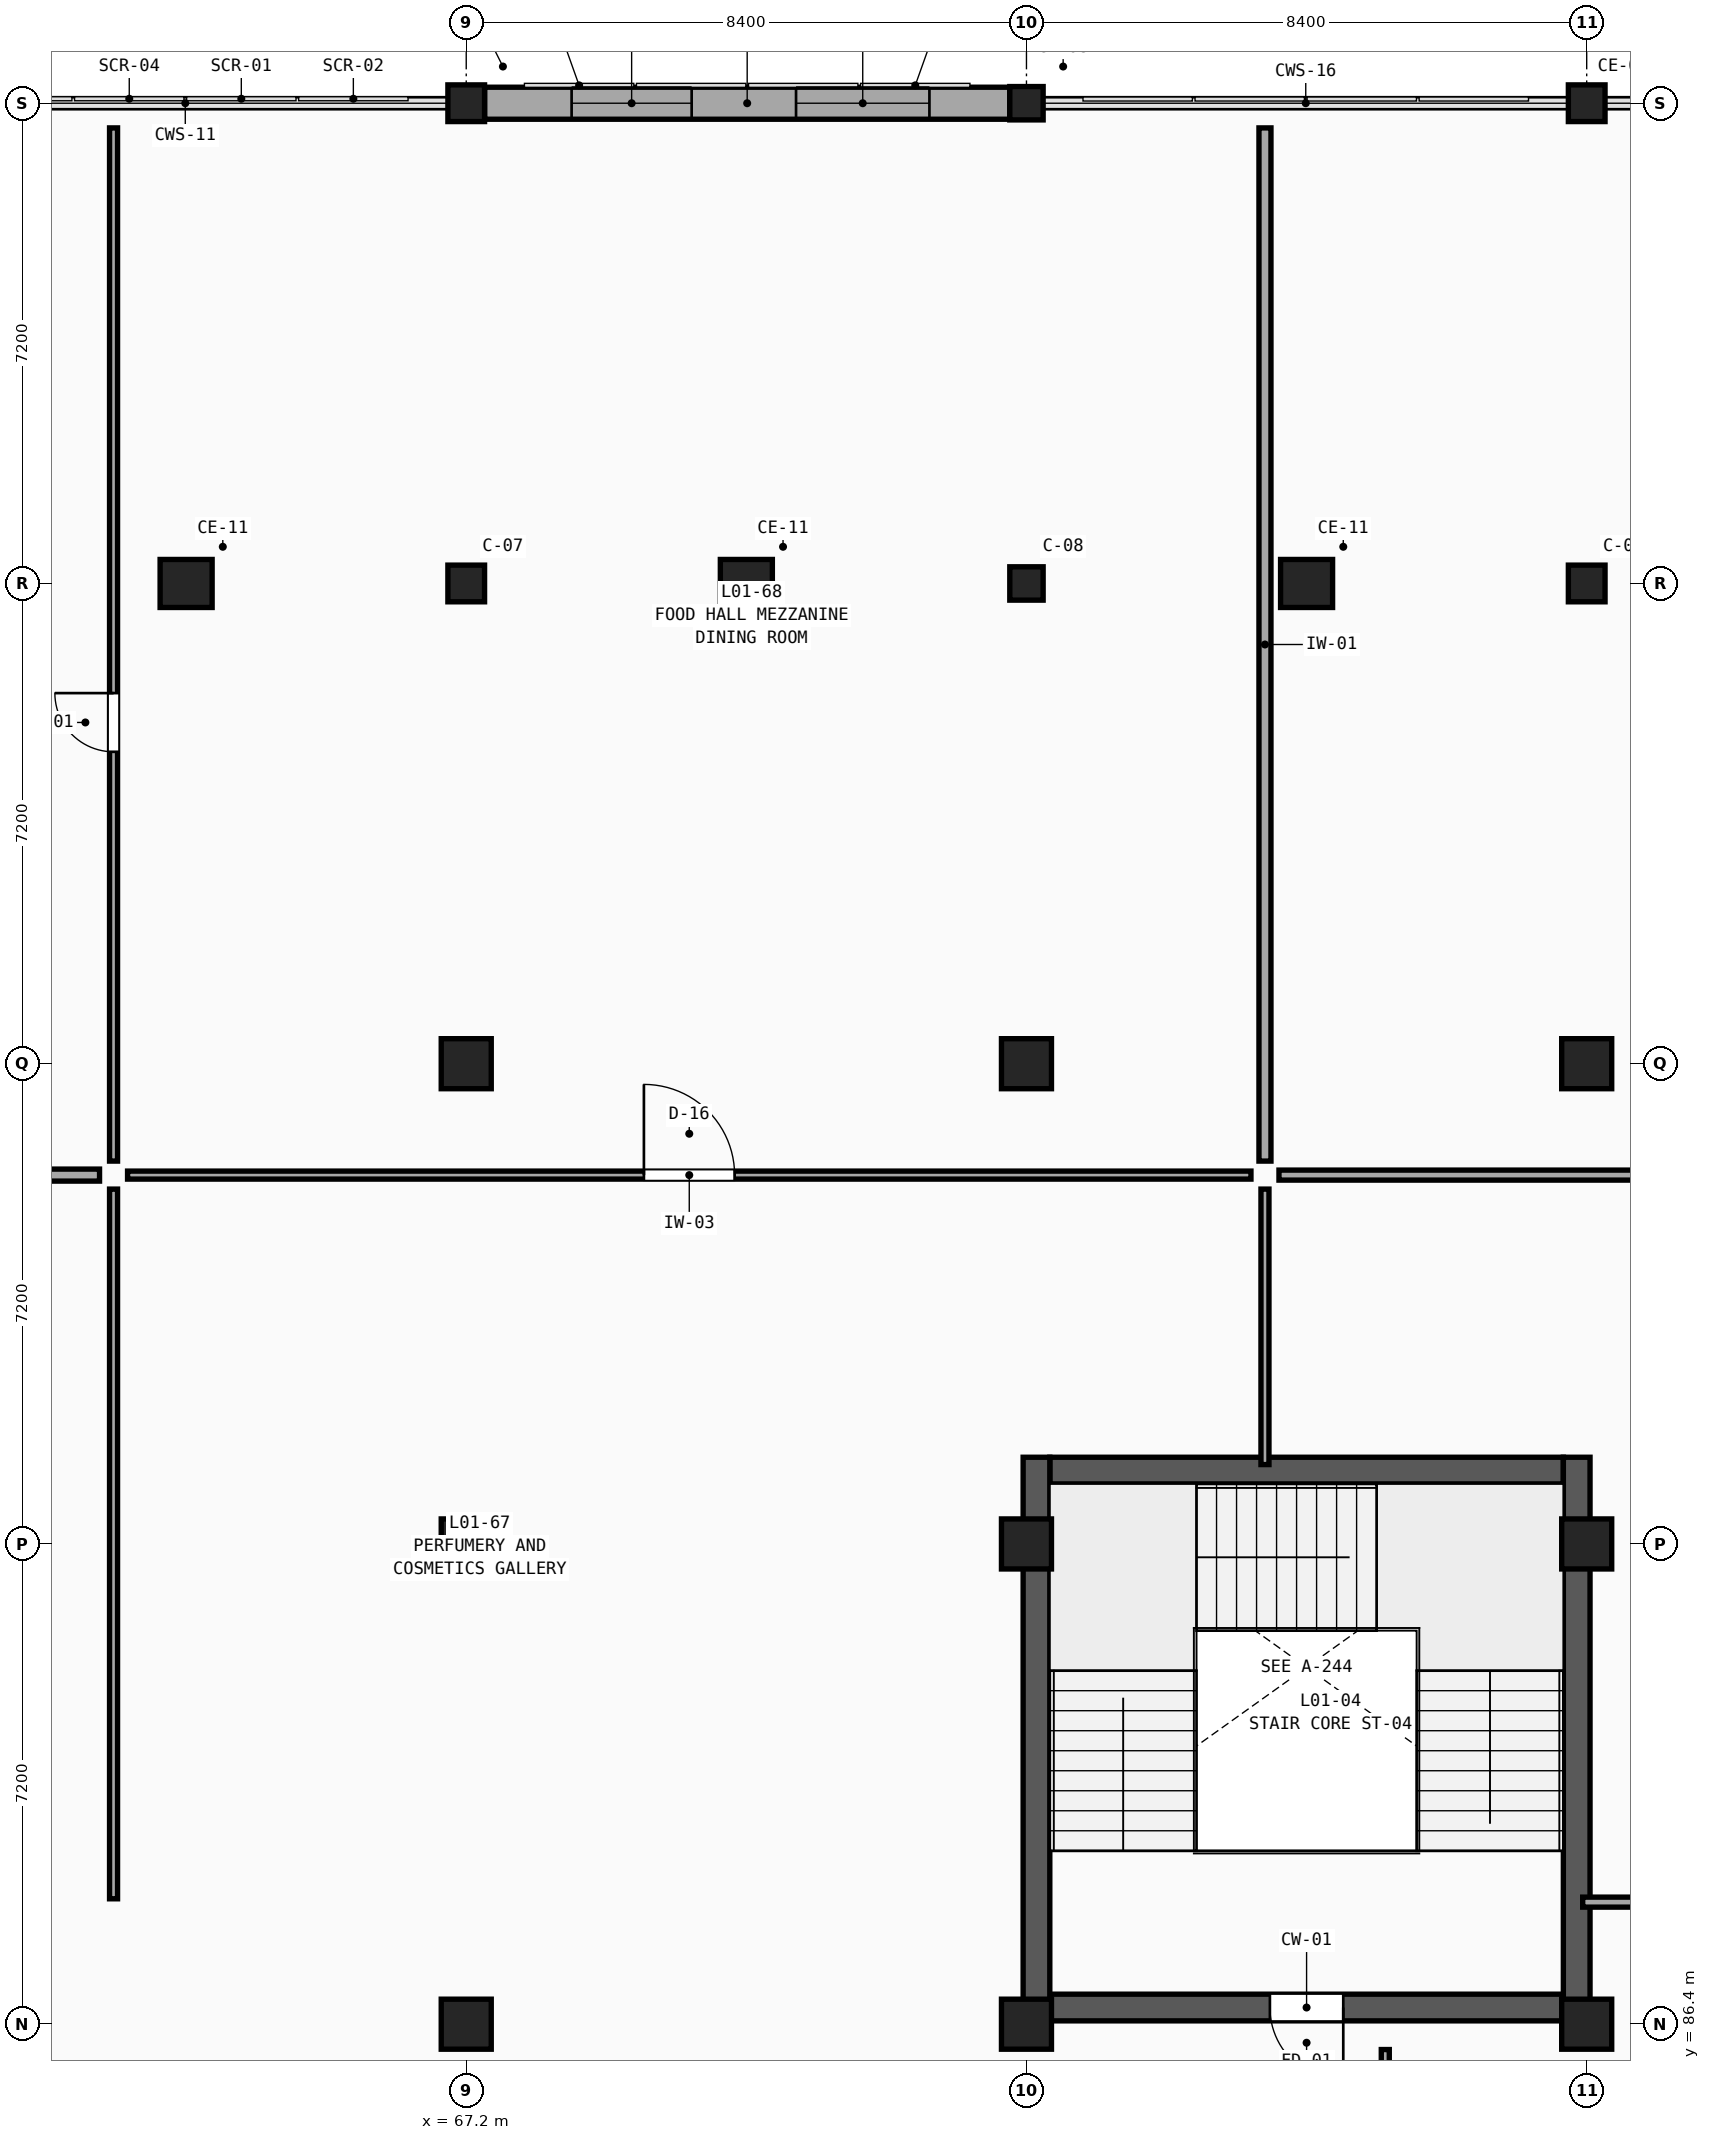
"""IFC4 building model, lengths in metres.
Left out: names, types, materials, properties, quantities, classifications, styles, units other than length and angle.
Written with IfcOpenShell. Run it as: python <this file> out.ifc"""

import sys

from ifc_helpers import new_model, si_unit, direction, frame, frame_2d, origin, origin_2d, place, context, subcontext, project, spatial, rectangle, extrude, element, fill, save


model = new_model("IFC4")
c1 = context("Model", 3, precision=1e-05, world=origin(), true_north=direction((0.0, 1.0)))
c2 = subcontext(c1, "Body", "Model", "MODEL_VIEW")
j1 = project(units=[si_unit("LENGTHUNIT", "METRE"), si_unit("PLANEANGLEUNIT", "RADIAN")], contexts=[c1])
p1 = place(None, origin())
s1 = spatial("IfcSite", under=j1, at=p1, CompositionType="ELEMENT")
p2 = place(p1, origin())
s2 = spatial("IfcBuilding", under=s1, at=p2, CompositionType="ELEMENT")
p3 = place(p2, frame((0.0, 0.0, 5.4)))
s3 = spatial("IfcBuildingStorey", under=s2, at=p3, CompositionType="ELEMENT", Elevation=5.4)
for number, where, z_axis, x_axis in (
    (1, (67.2, 86.4, 0.0), (0.0, 0.0, 1.0), (1.0, 0.0, 0.0)),
    (2, (67.2, 93.6, 0.0), (0.0, 0.0, 1.0), (1.0, 0.0, 0.0)),
    (3, (67.2, 100.8, 0.0), (0.0, 0.0, 1.0), (1.0, 0.0, 0.0)),
):
    element("IfcColumn", number, at=place(p3, frame(where, z_axis=z_axis, x_axis=x_axis)), inside=s3, PredefinedType="COLUMN", context=c2, shape_type="SweptSolid", body=[
        extrude(rectangle(XDim=0.75, YDim=0.75, at=origin_2d()), origin(), (0.0, 0.0, 1.0), 4.5),
    ])
for number, where, z_axis, x_axis in (
    (4, (67.2, 108.0, 0.0), (0.0, 0.0, 1.0), (1.0, 0.0, 0.0)),
    (5, (67.2, 115.2, 0.0), (0.0, 0.0, 1.0), (1.0, 0.0, 0.0)),
):
    element("IfcColumn", number, at=place(p3, frame(where, z_axis=z_axis, x_axis=x_axis)), inside=s3, PredefinedType="COLUMN", context=c2, shape_type="SweptSolid", body=[
        extrude(rectangle(XDim=0.55, YDim=0.55, at=origin_2d()), origin(), (0.0, 0.0, 1.0), 4.5),
    ])
for number, where, z_axis, x_axis in (
    (6, (75.6, 86.4, 0.0), (0.0, 0.0, 1.0), (1.0, 0.0, 0.0)),
    (7, (75.6, 93.6, 0.0), (0.0, 0.0, 1.0), (1.0, 0.0, 0.0)),
    (8, (75.6, 100.8, 0.0), (0.0, 0.0, 1.0), (1.0, 0.0, 0.0)),
):
    element("IfcColumn", number, at=place(p3, frame(where, z_axis=z_axis, x_axis=x_axis)), inside=s3, PredefinedType="COLUMN", context=c2, shape_type="SweptSolid", body=[
        extrude(rectangle(XDim=0.75, YDim=0.75, at=origin_2d()), origin(), (0.0, 0.0, 1.0), 4.5),
    ])
for number, where, z_axis, x_axis in (
    (9, (75.6, 108.0, 0.0), (0.0, 0.0, 1.0), (1.0, 0.0, 0.0)),
    (10, (75.6, 115.2, 0.0), (0.0, 0.0, 1.0), (1.0, 0.0, 0.0)),
):
    element("IfcColumn", number, at=place(p3, frame(where, z_axis=z_axis, x_axis=x_axis)), inside=s3, PredefinedType="COLUMN", context=c2, shape_type="SweptSolid", body=[
        extrude(rectangle(XDim=0.5, YDim=0.5, at=origin_2d()), origin(), (0.0, 0.0, 1.0), 4.5),
    ])
for number, where, z_axis, x_axis in (
    (11, (84.0, 86.4, 0.0), (0.0, 0.0, 1.0), (1.0, 0.0, 0.0)),
    (12, (84.0, 93.6, 0.0), (0.0, 0.0, 1.0), (1.0, 0.0, 0.0)),
    (13, (84.0, 100.8, 0.0), (0.0, 0.0, 1.0), (1.0, 0.0, 0.0)),
):
    element("IfcColumn", number, at=place(p3, frame(where, z_axis=z_axis, x_axis=x_axis)), inside=s3, PredefinedType="COLUMN", context=c2, shape_type="SweptSolid", body=[
        extrude(rectangle(XDim=0.75, YDim=0.75, at=origin_2d()), origin(), (0.0, 0.0, 1.0), 4.5),
    ])
for number, where, z_axis, x_axis in (
    (14, (84.0, 108.0, 0.0), (0.0, 0.0, 1.0), (1.0, 0.0, 0.0)),
    (15, (84.0, 115.2, 0.0), (0.0, 0.0, 1.0), (1.0, 0.0, 0.0)),
):
    element("IfcColumn", number, at=place(p3, frame(where, z_axis=z_axis, x_axis=x_axis)), inside=s3, PredefinedType="COLUMN", context=c2, shape_type="SweptSolid", body=[
        extrude(rectangle(XDim=0.55, YDim=0.55, at=origin_2d()), origin(), (0.0, 0.0, 1.0), 4.5),
    ])
for number, where, z_axis, x_axis in (
    (16, (63.0, 108.0, 0.0), (0.0, 0.0, 1.0), (1.0, 0.0, 0.0)),
    (17, (71.4, 108.0, 0.0), (0.0, 0.0, 1.0), (1.0, 0.0, 0.0)),
    (18, (79.8, 108.0, 0.0), (0.0, 0.0, 1.0), (1.0, 0.0, 0.0)),
):
    element("IfcColumn", number, at=place(p3, frame(where, z_axis=z_axis, x_axis=x_axis)), inside=s3, PredefinedType="PILASTER", context=c2, shape_type="SweptSolid", body=[
        extrude(rectangle(XDim=0.78, YDim=0.72, at=origin_2d()), origin(), (0.0, 0.0, 1.0), 4.5),
    ])
p4 = place(p3, frame((67.475, 115.2, 0.0), z_axis=(0.0, 0.0, 1.0), x_axis=(1.0, 0.0, 0.0)))
e19 = element("IfcWall", 19, at=p4, inside=s3, PredefinedType="SOLIDWALL", context=c2, shape_type="SweptSolid", body=[
    extrude(rectangle(XDim=7.875, YDim=0.48, at=frame_2d((3.938, 0.0))), origin(), (0.0, 0.0, 1.0), 3.63),
])
p5 = place(p4, frame((1.305, 0.0, 0.75)))
e20 = element("IfcOpeningElement", 20, at=p5, cuts=e19, PredefinedType="OPENING", context=c2, shape_type="SweptSolid", body=[
    extrude(rectangle(XDim=1.8, YDim=2.62, at=frame_2d((0.9, 1.31))), frame((0.0, 0.26, 0.0), z_axis=(0.0, -1.0, 0.0), x_axis=(1.0, 0.0, 0.0)), (0.0, 0.0, 1.0), 0.52),
])
p6 = place(p4, frame((4.67, 0.0, 0.75)))
e21 = element("IfcOpeningElement", 21, at=p6, cuts=e19, PredefinedType="OPENING", context=c2, shape_type="SweptSolid", body=[
    extrude(rectangle(XDim=2.0, YDim=2.62, at=frame_2d((1.0, 1.31))), frame((0.0, 0.26, 0.0), z_axis=(0.0, -1.0, 0.0), x_axis=(1.0, 0.0, 0.0)), (0.0, 0.0, 1.0), 0.52),
])
p7 = place(p3, frame((83.65, 86.65, 0.0), z_axis=(0.0, 0.0, 1.0), x_axis=(-1.0, 0.0, 0.0)))
e22 = element("IfcWall", 22, at=p7, inside=s3, PredefinedType="SHEAR", context=c2, shape_type="SweptSolid", body=[
    extrude(rectangle(XDim=7.7, YDim=0.4, at=frame_2d((3.85, 0.0))), origin(), (0.0, 0.0, 1.0), 4.5),
])
p8 = place(p7, frame((3.3, 0.0, 0.0)))
e23 = element("IfcOpeningElement", 23, at=p8, cuts=e22, PredefinedType="OPENING", context=c2, shape_type="SweptSolid", body=[
    extrude(rectangle(XDim=1.1, YDim=2.2, at=frame_2d((0.55, 1.1))), frame((0.0, 0.22, 0.0), z_axis=(0.0, -1.0, 0.0), x_axis=(1.0, 0.0, 0.0)), (0.0, 0.0, 1.0), 0.44),
])
p9 = place(p3, frame((75.95, 94.7, 0.0), z_axis=(0.0, 0.0, 1.0), x_axis=(1.0, 0.0, 0.0)))
e24 = element("IfcWall", 24, at=p9, inside=s3, PredefinedType="SHEAR", context=c2, shape_type="SweptSolid", body=[
    extrude(rectangle(XDim=7.7, YDim=0.4, at=frame_2d((3.85, 0.0))), origin(), (0.0, 0.0, 1.0), 4.5),
])
for number, where, z_axis, x_axis in (
    (25, (75.75, 94.9, 0.0), (0.0, 0.0, 1.0), (0.0, -1.0, 0.0)),
    (26, (83.85, 86.45, 0.0), (0.0, 0.0, 1.0), (0.0, 1.0, 0.0)),
):
    element("IfcWall", number, at=place(p3, frame(where, z_axis=z_axis, x_axis=x_axis)), inside=s3, PredefinedType="SHEAR", context=c2, shape_type="SweptSolid", body=[
        extrude(rectangle(XDim=8.45, YDim=0.4, at=frame_2d((4.225, 0.0))), origin(), (0.0, 0.0, 1.0), 4.5),
    ])
p10 = place(p3, frame((80.98, 84.18, 0.0), z_axis=(0.0, 0.0, 1.0), x_axis=(0.0, 1.0, 0.0)))
e27 = element("IfcWall", 27, at=p10, inside=s3, PredefinedType="PARTITIONING", context=c2, shape_type="SweptSolid", body=[
    extrude(rectangle(XDim=1.84, YDim=0.12, at=frame_2d((0.92, 0.0))), origin(), (0.0, 0.0, 1.0), 4.18),
])
p11 = place(p10, frame((0.48, 0.0, 0.0)))
e28 = element("IfcOpeningElement", 28, at=p11, cuts=e27, PredefinedType="OPENING", context=c2, shape_type="SweptSolid", body=[
    extrude(rectangle(XDim=0.88, YDim=2.37, at=frame_2d((0.44, 1.185))), frame((0.0, 0.08, 0.0), z_axis=(0.0, -1.0, 0.0), x_axis=(1.0, 0.0, 0.0)), (0.0, 0.0, 1.0), 0.16),
])
p12 = place(p3, frame((39.258, 99.13, 0.0), z_axis=(0.0, 0.0, 1.0), x_axis=(1.0, 0.0, 0.0)))
e29 = element("IfcWall", 29, at=p12, inside=s3, PredefinedType="PARTITIONING", context=c2, shape_type="SweptSolid", body=[
    extrude(rectangle(XDim=22.444, YDim=0.18, at=frame_2d((11.222, 0.0))), origin(), (0.0, 0.0, 1.0), 4.18),
])
p13 = place(p12, frame((8.99, 0.0, 0.0)))
e30 = element("IfcOpeningElement", 30, at=p13, cuts=e29, PredefinedType="OPENING", context=c2, shape_type="SweptSolid", body=[
    extrude(rectangle(XDim=1.04, YDim=2.21, at=frame_2d((0.52, 1.105))), frame((0.0, 0.11, 0.0), z_axis=(0.0, -1.0, 0.0), x_axis=(1.0, 0.0, 0.0)), (0.0, 0.0, 1.0), 0.22),
])
p14 = place(p3, frame((79.386, 99.13, 0.0), z_axis=(0.0, 0.0, 1.0), x_axis=(1.0, 0.0, 0.0)))
e31 = element("IfcWall", 31, at=p14, inside=s3, PredefinedType="PARTITIONING", context=c2, shape_type="SweptSolid", body=[
    extrude(rectangle(XDim=21.044, YDim=0.15, at=frame_2d((10.522, 0.0))), origin(), (0.0, 0.0, 1.0), 4.18),
])
p15 = place(p14, frame((9.922, 0.0, 0.0)))
e32 = element("IfcOpeningElement", 32, at=p15, cuts=e31, PredefinedType="OPENING", context=c2, shape_type="SweptSolid", body=[
    extrude(rectangle(XDim=1.2, YDim=2.21, at=frame_2d((0.6, 1.105))), frame((0.0, 0.095, 0.0), z_axis=(0.0, -1.0, 0.0), x_axis=(1.0, 0.0, 0.0)), (0.0, 0.0, 1.0), 0.19),
])
p16 = place(p3, frame((62.122, 99.13, 0.0), z_axis=(0.0, 0.0, 1.0), x_axis=(1.0, 0.0, 0.0)))
e33 = element("IfcWall", 33, at=p16, inside=s3, PredefinedType="PARTITIONING", context=c2, shape_type="SweptSolid", body=[
    extrude(rectangle(XDim=16.844, YDim=0.12, at=frame_2d((8.422, 0.0))), origin(), (0.0, 0.0, 1.0), 4.18),
])
p17 = place(p16, frame((7.742, 0.0, 0.0)))
e34 = element("IfcOpeningElement", 34, at=p17, cuts=e33, PredefinedType="OPENING", context=c2, shape_type="SweptSolid", body=[
    extrude(rectangle(XDim=1.36, YDim=2.21, at=frame_2d((0.68, 1.105))), frame((0.0, 0.08, 0.0), z_axis=(0.0, -1.0, 0.0), x_axis=(1.0, 0.0, 0.0)), (0.0, 0.0, 1.0), 0.16),
])
p18 = place(p3, frame((83.94, 88.23, 0.0), z_axis=(0.0, 0.0, 1.0), x_axis=(1.0, 0.0, 0.0)))
e35 = element("IfcWall", 35, at=p18, inside=s3, PredefinedType="PARTITIONING", context=c2, shape_type="SweptSolid", body=[
    extrude(rectangle(XDim=16.49, YDim=0.15, at=frame_2d((8.245, 0.0))), origin(), (0.0, 0.0, 1.0), 4.18),
])
p19 = place(p18, frame((7.805, 0.0, 0.0)))
e36 = element("IfcOpeningElement", 36, at=p19, cuts=e35, PredefinedType="OPENING", context=c2, shape_type="SweptSolid", body=[
    extrude(rectangle(XDim=0.88, YDim=2.05, at=frame_2d((0.44, 1.025))), frame((0.0, 0.095, 0.0), z_axis=(0.0, -1.0, 0.0), x_axis=(1.0, 0.0, 0.0)), (0.0, 0.0, 1.0), 0.19),
])
p20 = place(p3, frame((61.912, 99.34, 0.0), z_axis=(0.0, 0.0, 1.0), x_axis=(0.0, 1.0, 0.0)))
e37 = element("IfcWall", 37, at=p20, inside=s3, PredefinedType="PARTITIONING", context=c2, shape_type="SweptSolid", body=[
    extrude(rectangle(XDim=15.49, YDim=0.12, at=frame_2d((7.745, 0.0))), origin(), (0.0, 0.0, 1.0), 4.18),
])
p21 = place(p20, frame((6.136, 0.0, 0.0)))
e38 = element("IfcOpeningElement", 38, at=p21, cuts=e37, PredefinedType="OPENING", context=c2, shape_type="SweptSolid", body=[
    extrude(rectangle(XDim=0.88, YDim=2.05, at=frame_2d((0.44, 1.025))), frame((0.0, 0.08, 0.0), z_axis=(0.0, -1.0, 0.0), x_axis=(1.0, 0.0, 0.0)), (0.0, 0.0, 1.0), 0.16),
])
p22 = place(p3, frame((79.176, 99.34, 0.0), z_axis=(0.0, 0.0, 1.0), x_axis=(0.0, 1.0, 0.0)))
e39 = element("IfcWall", 39, at=p22, inside=s3, PredefinedType="PARTITIONING", context=c2, shape_type="SweptSolid", body=[
    extrude(rectangle(XDim=15.49, YDim=0.18, at=frame_2d((7.745, 0.0))), origin(), (0.0, 0.0, 1.0), 4.18),
])
p23 = place(p3, frame((61.912, 88.28, 0.0), z_axis=(0.0, 0.0, 1.0), x_axis=(0.0, 1.0, 0.0)))
e40 = element("IfcWall", 40, at=p23, inside=s3, PredefinedType="PARTITIONING", context=c2, shape_type="SweptSolid", body=[
    extrude(rectangle(XDim=10.64, YDim=0.12, at=frame_2d((5.32, 0.0))), origin(), (0.0, 0.0, 1.0), 4.18),
])
p24 = place(p3, frame((79.176, 94.79, 0.0), z_axis=(0.0, 0.0, 1.0), x_axis=(0.0, 1.0, 0.0)))
e41 = element("IfcWall", 41, at=p24, inside=s3, PredefinedType="PARTITIONING", context=c2, shape_type="SweptSolid", body=[
    extrude(rectangle(XDim=4.13, YDim=0.12, at=frame_2d((2.065, 0.0))), origin(), (0.0, 0.0, 1.0), 4.18),
])
p25 = place(p5, origin())
e42 = element("IfcWindow", 42, at=p25, inside=s3, PartitioningType="DOUBLE_PANEL_VERTICAL", PredefinedType="WINDOW", context=c2, shape_type="SweptSolid", body=[
    extrude(rectangle(XDim=1.8, YDim=2.62, at=frame_2d((0.9, 1.31))), frame((0.0, 0.03, 0.0), z_axis=(0.0, -1.0, 0.0), x_axis=(1.0, 0.0, 0.0)), (0.0, 0.0, 1.0), 0.06),
])
fill(e20, e42)
p26 = place(p6, origin())
e43 = element("IfcWindow", 43, at=p26, inside=s3, PartitioningType="TRIPLE_PANEL_VERTICAL", PredefinedType="WINDOW", context=c2, shape_type="SweptSolid", body=[
    extrude(rectangle(XDim=2.0, YDim=2.62, at=frame_2d((1.0, 1.31))), frame((0.0, 0.03, 0.0), z_axis=(0.0, -1.0, 0.0), x_axis=(1.0, 0.0, 0.0)), (0.0, 0.0, 1.0), 0.06),
])
fill(e21, e43)
p27 = place(p8, origin())
e44 = element("IfcDoor", 44, at=p27, inside=s3, OperationType="SINGLE_SWING_LEFT", PredefinedType="DOOR", context=c2, shape_type="SweptSolid", body=[
    extrude(rectangle(XDim=1.1, YDim=2.2, at=frame_2d((0.55, 1.1))), frame((0.0, 0.025, 0.0), z_axis=(0.0, -1.0, 0.0), x_axis=(1.0, 0.0, 0.0)), (0.0, 0.0, 1.0), 0.05),
])
fill(e23, e44)
p28 = place(p17, origin())
e45 = element("IfcDoor", 45, at=p28, inside=s3, OperationType="SINGLE_SWING_LEFT", PredefinedType="DOOR", context=c2, shape_type="SweptSolid", body=[
    extrude(rectangle(XDim=1.36, YDim=2.21, at=frame_2d((0.68, 1.105))), frame((0.0, 0.025, 0.0), z_axis=(0.0, -1.0, 0.0), x_axis=(1.0, 0.0, 0.0)), (0.0, 0.0, 1.0), 0.05),
])
fill(e34, e45)
p29 = place(p21, origin())
e46 = element("IfcDoor", 46, at=p29, inside=s3, OperationType="SINGLE_SWING_RIGHT", PredefinedType="DOOR", context=c2, shape_type="SweptSolid", body=[
    extrude(rectangle(XDim=0.88, YDim=2.05, at=frame_2d((0.44, 1.025))), frame((0.0, 0.025, 0.0), z_axis=(0.0, -1.0, 0.0), x_axis=(1.0, 0.0, 0.0)), (0.0, 0.0, 1.0), 0.05),
])
fill(e38, e46)
save(model, sys.argv[1])
